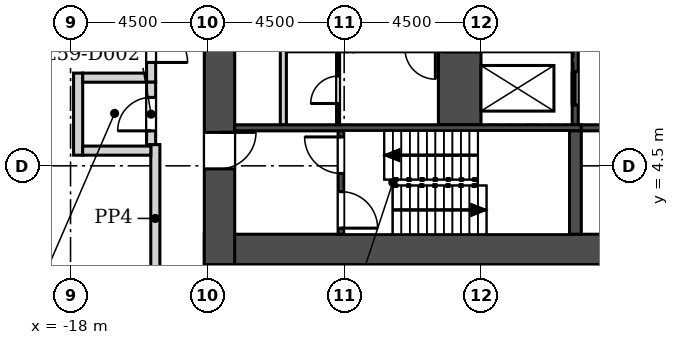
"""IFC4 building model, lengths in metres.
Left out: names, types, materials, properties, quantities, classifications, styles, units other than length and angle.
Written with IfcOpenShell. Run it as: python <this file> out.ifc"""

import sys

from ifc_helpers import new_model, si_unit, direction, frame, frame_2d, origin, place, context, subcontext, project, spatial, rectangle, extrude, element, fill, save


model = new_model("IFC4")
c1 = context("Model", 3, precision=1e-05, world=origin(), true_north=direction((0.0, 1.0)))
c2 = subcontext(c1, "Body", "Model", "MODEL_VIEW")
j1 = project(units=[si_unit("LENGTHUNIT", "METRE"), si_unit("PLANEANGLEUNIT", "RADIAN")], contexts=[c1])
p1 = place(None, origin())
s1 = spatial("IfcSite", under=j1, at=p1, CompositionType="ELEMENT")
p2 = place(p1, origin())
s2 = spatial("IfcBuilding", under=s1, at=p2, CompositionType="ELEMENT")
p3 = place(p2, frame((0.0, 0.0, 259.5)))
s3 = spatial("IfcBuildingStorey", under=s2, at=p3, CompositionType="ELEMENT", Elevation=259.5)
p4 = place(p3, frame((-13.6, 1.75, 0.0), z_axis=(0.0, 0.0, 1.0), x_axis=(1.0, 0.0, 0.0)))
e1 = element("IfcWall", 1, at=p4, inside=s3, PredefinedType="SHEAR", context=c2, shape_type="SweptSolid", body=[
    extrude(rectangle(XDim=27.2, YDim=1.0, at=frame_2d((13.6, 0.0))), origin(), (0.0, 0.0, 1.0), 7.2),
])
p5 = place(p3, frame((-13.1, 10.945, 0.0), z_axis=(0.0, 0.0, 1.0), x_axis=(0.0, -1.0, 0.0)))
e2 = element("IfcWall", 2, at=p5, inside=s3, PredefinedType="SHEAR", context=c2, shape_type="SweptSolid", body=[
    extrude(rectangle(XDim=9.695, YDim=1.0, at=frame_2d((4.848, 0.0))), origin(), (0.0, 0.0, 1.0), 7.2),
])
p6 = place(p5, frame((5.345, 0.0, 0.0)))
e3 = element("IfcOpeningElement", 3, at=p6, cuts=e2, PredefinedType="OPENING", context=c2, shape_type="SweptSolid", body=[
    extrude(rectangle(XDim=1.2, YDim=2.1, at=frame_2d((0.6, 1.05))), frame((0.0, 0.51, 0.0), z_axis=(0.0, -1.0, 0.0), x_axis=(1.0, 0.0, 0.0)), (0.0, 0.0, 1.0), 1.02),
])
p7 = place(p5, frame((1.345, 0.0, 0.0)))
e4 = element("IfcOpeningElement", 4, at=p7, cuts=e2, PredefinedType="OPENING", context=c2, shape_type="SweptSolid", body=[
    extrude(rectangle(XDim=1.2, YDim=2.1, at=frame_2d((0.6, 1.05))), frame((0.0, 0.51, 0.0), z_axis=(0.0, -1.0, 0.0), x_axis=(1.0, 0.0, 0.0)), (0.0, 0.0, 1.0), 1.02),
])
p8 = place(p3, frame((-4.353, 45.242, 0.0), z_axis=(0.0, 0.0, 1.0), x_axis=(-0.500000891752, -0.866024888931, 0.0)))
e5 = element("IfcWall", 5, at=p8, inside=s3, PredefinedType="SOLIDWALL", context=c2, shape_type="SweptSolid", body=[
    extrude(rectangle(XDim=43.339, YDim=0.34, at=frame_2d((21.669, 0.0))), origin(), (0.0, 0.0, 1.0), 6.8),
])
p9 = place(p3, frame((-11.0, 5.85, 0.0), z_axis=(0.0, 0.0, 1.0), x_axis=(0.0, 1.0, 0.0)))
e6 = element("IfcWall", 6, at=p9, inside=s3, PredefinedType="SOLIDWALL", context=c2, shape_type="SweptSolid", body=[
    extrude(rectangle(XDim=7.4, YDim=0.2, at=frame_2d((3.7, 0.0))), origin(), (0.0, 0.0, 1.0), 6.8),
])
p10 = place(p3, frame((-1.4, 5.85, -0.4), z_axis=(0.0, 0.0, 1.0), x_axis=(0.0, 1.0, 0.0)))
e7 = element("IfcWall", 7, at=p10, inside=s3, PredefinedType="SOLIDWALL", context=c2, shape_type="SweptSolid", body=[
    extrude(rectangle(XDim=11.75, YDim=0.2, at=frame_2d((5.875, 0.0))), origin(), (0.0, 0.0, 1.0), 7.2),
])
p11 = place(p10, frame((0.65, 0.0, 0.4)))
e8 = element("IfcOpeningElement", 8, at=p11, cuts=e7, PredefinedType="OPENING", context=c2, shape_type="SweptSolid", body=[
    extrude(rectangle(XDim=1.1, YDim=2.1, at=frame_2d((0.55, 1.05))), frame((0.0, 0.11, 0.0), z_axis=(0.0, -1.0, 0.0), x_axis=(1.0, 0.0, 0.0)), (0.0, 0.0, 1.0), 0.22),
])
p12 = place(p10, frame((3.3, 0.0, 0.4)))
e9 = element("IfcOpeningElement", 9, at=p12, cuts=e7, PredefinedType="OPENING", context=c2, shape_type="SweptSolid", body=[
    extrude(rectangle(XDim=1.0, YDim=2.1, at=frame_2d((0.5, 1.05))), frame((0.0, 0.11, 0.0), z_axis=(0.0, -1.0, 0.0), x_axis=(1.0, 0.0, 0.0)), (0.0, 0.0, 1.0), 0.22),
])
p13 = place(p10, frame((7.2, 0.0, 0.4)))
e10 = element("IfcOpeningElement", 10, at=p13, cuts=e7, PredefinedType="OPENING", context=c2, shape_type="SweptSolid", body=[
    extrude(rectangle(XDim=1.0, YDim=2.1, at=frame_2d((0.5, 1.05))), frame((0.0, 0.11, 0.0), z_axis=(0.0, -1.0, 0.0), x_axis=(1.0, 0.0, 0.0)), (0.0, 0.0, 1.0), 0.22),
])
p14 = place(p3, frame((-5.2, 5.85, -0.4), z_axis=(0.0, 0.0, 1.0), x_axis=(0.0, 1.0, 0.0)))
e11 = element("IfcWall", 11, at=p14, inside=s3, PredefinedType="SOLIDWALL", context=c2, shape_type="SweptSolid", body=[
    extrude(rectangle(XDim=2.4, YDim=1.4, at=frame_2d((1.2, 0.0))), origin(), (0.0, 0.0, 1.0), 7.2),
])
p15 = place(p3, frame((-12.6, 5.75, -0.4), z_axis=(0.0, 0.0, 1.0), x_axis=(1.0, 0.0, 0.0)))
e12 = element("IfcWall", 12, at=p15, inside=s3, PredefinedType="SOLIDWALL", context=c2, shape_type="SweptSolid", body=[
    extrude(rectangle(XDim=11.4, YDim=0.2, at=frame_2d((5.7, 0.0))), origin(), (0.0, 0.0, 1.0), 7.2),
])
p16 = place(p3, frame((-1.2, 5.75, -0.4), z_axis=(0.0, 0.0, 1.0), x_axis=(1.0, 0.0, 0.0)))
e13 = element("IfcWall", 13, at=p16, inside=s3, PredefinedType="SOLIDWALL", context=c2, shape_type="SweptSolid", body=[
    extrude(rectangle(XDim=2.4, YDim=0.2, at=frame_2d((1.2, 0.0))), origin(), (0.0, 0.0, 1.0), 7.2),
])
p17 = place(p16, frame((0.7, 0.0, 0.4)))
e14 = element("IfcOpeningElement", 14, at=p17, cuts=e13, PredefinedType="OPENING", context=c2, shape_type="SweptSolid", body=[
    extrude(rectangle(XDim=1.0, YDim=2.1, at=frame_2d((0.5, 1.05))), frame((0.0, 0.11, 0.0), z_axis=(0.0, -1.0, 0.0), x_axis=(1.0, 0.0, 0.0)), (0.0, 0.0, 1.0), 0.22),
])
p18 = place(p3, frame((-9.1, 2.25, -0.4), z_axis=(0.0, 0.0, 1.0), x_axis=(0.0, 1.0, 0.0)))
e15 = element("IfcWall", 15, at=p18, inside=s3, PredefinedType="SOLIDWALL", context=c2, shape_type="SweptSolid", body=[
    extrude(rectangle(XDim=3.4, YDim=0.2, at=frame_2d((1.7, 0.0))), origin(), (0.0, 0.0, 1.0), 7.2),
])
p19 = place(p18, frame((0.2, 0.0, 0.4)))
e16 = element("IfcOpeningElement", 16, at=p19, cuts=e15, PredefinedType="OPENING", context=c2, shape_type="SweptSolid", body=[
    extrude(rectangle(XDim=1.2, YDim=2.1, at=frame_2d((0.6, 1.05))), frame((0.0, 0.11, 0.0), z_axis=(0.0, -1.0, 0.0), x_axis=(1.0, 0.0, 0.0)), (0.0, 0.0, 1.0), 0.22),
])
p20 = place(p18, frame((2.0, 0.0, 0.4)))
e17 = element("IfcOpeningElement", 17, at=p20, cuts=e15, PredefinedType="OPENING", context=c2, shape_type="SweptSolid", body=[
    extrude(rectangle(XDim=1.2, YDim=2.1, at=frame_2d((0.6, 1.05))), frame((0.0, 0.11, 0.0), z_axis=(0.0, -1.0, 0.0), x_axis=(1.0, 0.0, 0.0)), (0.0, 0.0, 1.0), 0.22),
])
p21 = place(p3, frame((-1.4, 2.25, -0.4), z_axis=(0.0, 0.0, 1.0), x_axis=(0.0, 1.0, 0.0)))
e18 = element("IfcWall", 18, at=p21, inside=s3, PredefinedType="SOLIDWALL", context=c2, shape_type="SweptSolid", body=[
    extrude(rectangle(XDim=3.4, YDim=0.4, at=frame_2d((1.7, 0.0))), origin(), (0.0, 0.0, 1.0), 7.2),
])
p22 = place(p3, frame((-9.2, 5.85, 0.0), z_axis=(0.0, 0.0, 1.0), x_axis=(0.0, 1.0, 0.0)))
e19 = element("IfcWall", 19, at=p22, inside=s3, PredefinedType="PARTITIONING", context=c2, shape_type="SweptSolid", body=[
    extrude(rectangle(XDim=2.4, YDim=0.1, at=frame_2d((1.2, 0.0))), origin(), (0.0, 0.0, 1.0), 6.8),
])
p23 = place(p22, frame((0.7, 0.0, 0.0)))
e20 = element("IfcOpeningElement", 20, at=p23, cuts=e19, PredefinedType="OPENING", context=c2, shape_type="SweptSolid", body=[
    extrude(rectangle(XDim=0.9, YDim=2.1, at=frame_2d((0.45, 1.05))), frame((0.0, 0.06, 0.0), z_axis=(0.0, -1.0, 0.0), x_axis=(1.0, 0.0, 0.0)), (0.0, 0.0, 1.0), 0.12),
])
p24 = place(p3, frame((-9.0, 3.95, 0.0), z_axis=(0.0, 0.0, 1.0), x_axis=(1.0, 0.0, 0.0)))
e21 = element("IfcWall", 21, at=p24, inside=s3, PredefinedType="SOLIDWALL", context=c2, shape_type="SweptSolid", body=[
    extrude(rectangle(XDim=1.6, YDim=0.2, at=frame_2d((0.8, 0.0))), origin(), (0.0, 0.0, 1.0), 6.8),
])
p25 = place(p3, frame((-15.211, 0.34, 0.0), z_axis=(0.0, 0.0, 1.0), x_axis=(0.0, 1.0, 0.0)))
e22 = element("IfcWall", 22, at=p25, inside=s3, PredefinedType="SOLIDWALL", context=c2, shape_type="SweptSolid", body=[
    extrude(rectangle(XDim=4.859, YDim=0.3, at=frame_2d((2.429, 0.0))), origin(), (0.0, 0.0, 1.0), 6.8),
])
p26 = place(p3, frame((-15.35, 7.25, 0.0), z_axis=(0.0, 0.0, 1.0), x_axis=(0.0, 1.0, 0.0)))
e23 = element("IfcWall", 23, at=p26, inside=s3, PredefinedType="SOLIDWALL", context=c2, shape_type="SweptSolid", body=[
    extrude(rectangle(XDim=4.364, YDim=0.3, at=frame_2d((2.182, 0.0))), origin(), (0.0, 0.0, 1.0), 6.8),
])
p27 = place(p26, frame((0.65, 0.0, 0.0)))
e24 = element("IfcOpeningElement", 24, at=p27, cuts=e23, PredefinedType="OPENING", context=c2, shape_type="SweptSolid", body=[
    extrude(rectangle(XDim=1.2, YDim=2.1, at=frame_2d((0.6, 1.05))), frame((0.0, 0.16, 0.0), z_axis=(0.0, -1.0, 0.0), x_axis=(1.0, 0.0, 0.0)), (0.0, 0.0, 1.0), 0.32),
])
p28 = place(p3, frame((-17.75, 4.85, 0.0), z_axis=(0.0, 0.0, 1.0), x_axis=(0.0, 1.0, 0.0)))
e25 = element("IfcWall", 25, at=p28, inside=s3, PredefinedType="SOLIDWALL", context=c2, shape_type="SweptSolid", body=[
    extrude(rectangle(XDim=2.7, YDim=0.3, at=frame_2d((1.35, 0.0))), origin(), (0.0, 0.0, 1.0), 6.8),
])
p29 = place(p3, frame((-15.36, 5.0, 0.0), z_axis=(0.0, 0.0, 1.0), x_axis=(-1.0, 0.0, 0.0)))
e26 = element("IfcWall", 26, at=p29, inside=s3, PredefinedType="SOLIDWALL", context=c2, shape_type="SweptSolid", body=[
    extrude(rectangle(XDim=2.24, YDim=0.3, at=frame_2d((1.12, 0.0))), origin(), (0.0, 0.0, 1.0), 6.8),
])
p30 = place(p3, frame((-17.6, 7.4, 0.0), z_axis=(0.0, 0.0, 1.0), x_axis=(1.0, 0.0, 0.0)))
e27 = element("IfcWall", 27, at=p30, inside=s3, PredefinedType="SOLIDWALL", context=c2, shape_type="SweptSolid", body=[
    extrude(rectangle(XDim=2.1, YDim=0.3, at=frame_2d((1.05, 0.0))), origin(), (0.0, 0.0, 1.0), 6.8),
])
p31 = place(p3, frame((-15.35, 5.199, 0.0), z_axis=(0.0, 0.0, 1.0), x_axis=(0.0, 1.0, 0.0)))
e28 = element("IfcWall", 28, at=p31, inside=s3, PredefinedType="SOLIDWALL", context=c2, shape_type="SweptSolid", body=[
    extrude(rectangle(XDim=2.051, YDim=0.3, at=frame_2d((1.025, 0.0))), origin(), (0.0, 0.0, 1.0), 6.8),
])
p32 = place(p31, frame((0.451, 0.0, 0.0)))
e29 = element("IfcOpeningElement", 29, at=p32, cuts=e28, PredefinedType="OPENING", context=c2, shape_type="SweptSolid", body=[
    extrude(rectangle(XDim=1.1, YDim=2.1, at=frame_2d((0.55, 1.05))), frame((0.0, 0.16, 0.0), z_axis=(0.0, -1.0, 0.0), x_axis=(1.0, 0.0, 0.0)), (0.0, 0.0, 1.0), 0.32),
])
p33 = place(p11, origin())
e30 = element("IfcDoor", 30, at=p33, inside=s3, OperationType="SLIDING_TO_RIGHT", PredefinedType="DOOR", context=c2, shape_type="SweptSolid", body=[
    extrude(rectangle(XDim=1.1, YDim=2.1, at=frame_2d((0.55, 1.05))), frame((0.0, 0.025, 0.0), z_axis=(0.0, -1.0, 0.0), x_axis=(1.0, 0.0, 0.0)), (0.0, 0.0, 1.0), 0.05),
])
fill(e8, e30)
p34 = place(p23, origin())
e31 = element("IfcDoor", 31, at=p34, inside=s3, OperationType="SINGLE_SWING_LEFT", PredefinedType="DOOR", context=c2, shape_type="SweptSolid", body=[
    extrude(rectangle(XDim=0.9, YDim=2.1, at=frame_2d((0.45, 1.05))), frame((0.0, 0.025, 0.0), z_axis=(0.0, -1.0, 0.0), x_axis=(1.0, 0.0, 0.0)), (0.0, 0.0, 1.0), 0.05),
])
fill(e20, e31)
p35 = place(p6, origin())
e32 = element("IfcDoor", 32, at=p35, inside=s3, OperationType="SINGLE_SWING_LEFT", PredefinedType="DOOR", context=c2, shape_type="SweptSolid", body=[
    extrude(rectangle(XDim=1.2, YDim=2.1, at=frame_2d((0.6, 1.05))), frame((0.0, 0.025, 0.0), z_axis=(0.0, -1.0, 0.0), x_axis=(1.0, 0.0, 0.0)), (0.0, 0.0, 1.0), 0.05),
])
fill(e3, e32)
p36 = place(p19, frame((1.2, 0.0, 0.0), z_axis=(0.0, 0.0, 1.0), x_axis=(-1.0, 0.0, 0.0)))
e33 = element("IfcDoor", 33, at=p36, inside=s3, OperationType="SINGLE_SWING_RIGHT", PredefinedType="DOOR", context=c2, shape_type="SweptSolid", body=[
    extrude(rectangle(XDim=1.2, YDim=2.1, at=frame_2d((0.6, 1.05))), frame((0.0, 0.025, 0.0), z_axis=(0.0, -1.0, 0.0), x_axis=(1.0, 0.0, 0.0)), (0.0, 0.0, 1.0), 0.05),
])
fill(e16, e33)
p37 = place(p20, origin())
e34 = element("IfcDoor", 34, at=p37, inside=s3, OperationType="SINGLE_SWING_RIGHT", PredefinedType="DOOR", context=c2, shape_type="SweptSolid", body=[
    extrude(rectangle(XDim=1.2, YDim=2.1, at=frame_2d((0.6, 1.05))), frame((0.0, 0.025, 0.0), z_axis=(0.0, -1.0, 0.0), x_axis=(1.0, 0.0, 0.0)), (0.0, 0.0, 1.0), 0.05),
])
fill(e17, e34)
p38 = place(p32, origin())
e35 = element("IfcDoor", 35, at=p38, inside=s3, OperationType="SINGLE_SWING_LEFT", PredefinedType="DOOR", context=c2, shape_type="SweptSolid", body=[
    extrude(rectangle(XDim=1.1, YDim=2.1, at=frame_2d((0.55, 1.05))), frame((0.0, 0.025, 0.0), z_axis=(0.0, -1.0, 0.0), x_axis=(1.0, 0.0, 0.0)), (0.0, 0.0, 1.0), 0.05),
])
fill(e29, e35)
p39 = place(p27, frame((1.2, 0.0, 0.0), z_axis=(0.0, 0.0, 1.0), x_axis=(-1.0, 0.0, 0.0)))
e36 = element("IfcDoor", 36, at=p39, inside=s3, OperationType="SINGLE_SWING_RIGHT", PredefinedType="DOOR", context=c2, shape_type="SweptSolid", body=[
    extrude(rectangle(XDim=1.2, YDim=2.1, at=frame_2d((0.6, 1.05))), frame((0.0, 0.025, 0.0), z_axis=(0.0, -1.0, 0.0), x_axis=(1.0, 0.0, 0.0)), (0.0, 0.0, 1.0), 0.05),
])
fill(e24, e36)
save(model, sys.argv[1])
